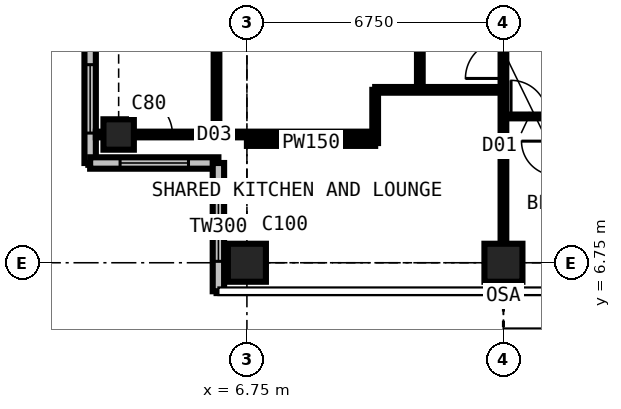
"""IFC4 building model, lengths in metres.
Left out: names, types, materials, properties, quantities, classifications, styles, units other than length and angle.
Written with IfcOpenShell. Run it as: python <this file> out.ifc"""

import sys

from ifc_helpers import new_model, si_unit, direction, frame, frame_2d, origin, origin_2d, place, context, subcontext, project, spatial, rectangle, extrude, element, fill, save


model = new_model("IFC4")
c1 = context("Model", 3, precision=1e-05, world=origin(), true_north=direction((0.0, 1.0)))
c2 = subcontext(c1, "Body", "Model", "MODEL_VIEW")
j1 = project(units=[si_unit("LENGTHUNIT", "METRE"), si_unit("PLANEANGLEUNIT", "RADIAN")], contexts=[c1])
p1 = place(None, origin())
s1 = spatial("IfcSite", under=j1, at=p1, CompositionType="ELEMENT")
p2 = place(p1, origin())
s2 = spatial("IfcBuilding", under=s1, at=p2, CompositionType="ELEMENT")
p3 = place(p2, frame((0.0, 0.0, 243.9)))
s3 = spatial("IfcBuildingStorey", under=s2, at=p3, CompositionType="ELEMENT", Elevation=243.9)
p4 = place(p3, frame((3.375, 10.125, 0.0), z_axis=(0.0, 0.0, 1.0), x_axis=(1.0, 0.0, 0.0)))
e1 = element("IfcColumn", 1, at=p4, inside=s3, PredefinedType="COLUMN", context=c2, shape_type="SweptSolid", body=[
    extrude(rectangle(XDim=0.8, YDim=0.8, at=origin_2d()), origin(), (0.0, 0.0, 1.0), 3.6),
])
for number, where, z_axis, x_axis in (
    (2, (6.75, 6.75, 0.0), (0.0, 0.0, 1.0), (1.0, 0.0, 0.0)),
    (3, (13.5, 6.75, 0.0), (0.0, 0.0, 1.0), (1.0, 0.0, 0.0)),
):
    element("IfcColumn", number, at=place(p3, frame(where, z_axis=z_axis, x_axis=x_axis)), inside=s3, PredefinedType="COLUMN", context=c2, shape_type="SweptSolid", body=[
        extrude(rectangle(XDim=1.0, YDim=1.0, at=origin_2d()), origin(), (0.0, 0.0, 1.0), 3.6),
    ])
p5 = place(p3, frame((2.625, 12.75, 0.0), z_axis=(0.0, 0.0, 1.0), x_axis=(0.0, -1.0, 0.0)))
e4 = element("IfcWall", 4, at=p5, inside=s3, PredefinedType="SOLIDWALL", context=c2, shape_type="SweptSolid", body=[
    extrude(rectangle(XDim=3.375, YDim=0.3, at=frame_2d((1.688, 0.0))), origin(), (0.0, 0.0, 1.0), 3.375),
])
p6 = place(p5, frame((0.788, 0.0, 0.6)))
e5 = element("IfcOpeningElement", 5, at=p6, cuts=e4, PredefinedType="OPENING", context=c2, shape_type="SweptSolid", body=[
    extrude(rectangle(XDim=1.8, YDim=2.1, at=frame_2d((0.9, 1.05))), frame((0.0, 0.16, 0.0), z_axis=(0.0, -1.0, 0.0), x_axis=(1.0, 0.0, 0.0)), (0.0, 0.0, 1.0), 0.32),
])
p7 = place(p3, frame((2.625, 9.375, 0.0), z_axis=(0.0, 0.0, 1.0), x_axis=(1.0, 0.0, 0.0)))
e6 = element("IfcWall", 6, at=p7, inside=s3, PredefinedType="SOLIDWALL", context=c2, shape_type="SweptSolid", body=[
    extrude(rectangle(XDim=3.375, YDim=0.3, at=frame_2d((1.688, 0.0))), origin(), (0.0, 0.0, 1.0), 3.375),
])
p8 = place(p7, frame((0.788, 0.0, 0.6)))
e7 = element("IfcOpeningElement", 7, at=p8, cuts=e6, PredefinedType="OPENING", context=c2, shape_type="SweptSolid", body=[
    extrude(rectangle(XDim=1.8, YDim=2.1, at=frame_2d((0.9, 1.05))), frame((0.0, 0.16, 0.0), z_axis=(0.0, -1.0, 0.0), x_axis=(1.0, 0.0, 0.0)), (0.0, 0.0, 1.0), 0.32),
])
p9 = place(p3, frame((6.0, 9.375, 0.0), z_axis=(0.0, 0.0, 1.0), x_axis=(0.0, -1.0, 0.0)))
e8 = element("IfcWall", 8, at=p9, inside=s3, PredefinedType="SOLIDWALL", context=c2, shape_type="SweptSolid", body=[
    extrude(rectangle(XDim=3.375, YDim=0.3, at=frame_2d((1.688, 0.0))), origin(), (0.0, 0.0, 1.0), 3.375),
])
p10 = place(p9, frame((0.788, 0.0, 0.6)))
e9 = element("IfcOpeningElement", 9, at=p10, cuts=e8, PredefinedType="OPENING", context=c2, shape_type="SweptSolid", body=[
    extrude(rectangle(XDim=1.8, YDim=2.1, at=frame_2d((0.9, 1.05))), frame((0.0, 0.16, 0.0), z_axis=(0.0, -1.0, 0.0), x_axis=(1.0, 0.0, 0.0)), (0.0, 0.0, 1.0), 0.32),
])
p11 = place(p3, frame((2.775, 10.125, 0.0), z_axis=(0.0, 0.0, 1.0), x_axis=(1.0, 0.0, 0.0)))
e10 = element("IfcWall", 10, at=p11, inside=s3, PredefinedType="PARTITIONING", context=c2, shape_type="SweptSolid", body=[
    extrude(rectangle(XDim=7.35, YDim=0.15, at=frame_2d((3.675, 0.0))), origin(), (0.0, 0.0, 1.0), 2.877),
])
p12 = place(p11, frame((1.016, 0.0, 0.0)))
e11 = element("IfcOpeningElement", 11, at=p12, cuts=e10, PredefinedType="OPENING", context=c2, shape_type="SweptSolid", body=[
    extrude(rectangle(XDim=1.0, YDim=2.2, at=frame_2d((0.5, 1.1))), frame((0.0, 0.085, 0.0), z_axis=(0.0, -1.0, 0.0), x_axis=(1.0, 0.0, 0.0)), (0.0, 0.0, 1.0), 0.17),
])
p13 = place(p3, frame((5.95, 10.125, 0.0), z_axis=(0.0, 0.0, 1.0), x_axis=(0.0, 1.0, 0.0)))
e12 = element("IfcWall", 12, at=p13, inside=s3, PredefinedType="PARTITIONING", context=c2, shape_type="SweptSolid", body=[
    extrude(rectangle(XDim=2.65, YDim=0.15, at=frame_2d((1.325, 0.0))), origin(), (0.0, 0.0, 1.0), 3.375),
])
p14 = place(p3, frame((6.75, 9.9, 0.0), z_axis=(0.0, 0.0, 1.0), x_axis=(1.0, 0.0, 0.0)))
e13 = element("IfcWall", 13, at=p14, inside=s3, PredefinedType="PARTITIONING", context=c2, shape_type="SweptSolid", body=[
    extrude(rectangle(XDim=3.375, YDim=0.15, at=frame_2d((1.688, 0.0))), origin(), (0.0, 0.0, 1.0), 3.375),
])
p15 = place(p3, frame((10.125, 9.9, 0.0), z_axis=(0.0, 0.0, 1.0), x_axis=(0.0, 1.0, 0.0)))
e14 = element("IfcWall", 14, at=p15, inside=s3, PredefinedType="PARTITIONING", context=c2, shape_type="SweptSolid", body=[
    extrude(rectangle(XDim=1.4, YDim=0.15, at=frame_2d((0.7, 0.0))), origin(), (0.0, 0.0, 1.0), 3.375),
])
p16 = place(p3, frame((10.125, 11.3, 0.0), z_axis=(0.0, 0.0, 1.0), x_axis=(1.0, 0.0, 0.0)))
e15 = element("IfcWall", 15, at=p16, inside=s3, PredefinedType="PARTITIONING", context=c2, shape_type="SweptSolid", body=[
    extrude(rectangle(XDim=3.375, YDim=0.15, at=frame_2d((1.688, 0.0))), origin(), (0.0, 0.0, 1.0), 3.375),
])
p17 = place(p3, frame((11.3, 11.3, 0.0), z_axis=(0.0, 0.0, 1.0), x_axis=(0.0, 1.0, 0.0)))
e16 = element("IfcWall", 16, at=p17, inside=s3, PredefinedType="PARTITIONING", context=c2, shape_type="SweptSolid", body=[
    extrude(rectangle(XDim=19.3, YDim=0.15, at=frame_2d((9.65, 0.0))), origin(), (0.0, 0.0, 1.0), 3.375),
])
p18 = place(p17, frame((18.1, 0.0, 0.0)))
e17 = element("IfcOpeningElement", 17, at=p18, cuts=e16, PredefinedType="OPENING", context=c2, shape_type="SweptSolid", body=[
    extrude(rectangle(XDim=1.0, YDim=2.2, at=frame_2d((0.5, 1.1))), frame((0.0, 0.085, 0.0), z_axis=(0.0, -1.0, 0.0), x_axis=(1.0, 0.0, 0.0)), (0.0, 0.0, 1.0), 0.17),
])
p19 = place(p17, frame((10.137, 0.0, 0.0)))
e18 = element("IfcOpeningElement", 18, at=p19, cuts=e16, PredefinedType="OPENING", context=c2, shape_type="SweptSolid", body=[
    extrude(rectangle(XDim=1.0, YDim=2.2, at=frame_2d((0.5, 1.1))), frame((0.0, 0.085, 0.0), z_axis=(0.0, -1.0, 0.0), x_axis=(1.0, 0.0, 0.0)), (0.0, 0.0, 1.0), 0.17),
])
p20 = place(p3, frame((13.5, 6.016, 0.0), z_axis=(0.0, 0.0, 1.0), x_axis=(0.0, 1.0, 0.0)))
e19 = element("IfcWall", 19, at=p20, inside=s3, PredefinedType="PARTITIONING", context=c2, shape_type="SweptSolid", body=[
    extrude(rectangle(XDim=6.884, YDim=0.15, at=frame_2d((3.442, 0.0))), origin(), (0.0, 0.0, 1.0), 2.61),
])
p21 = place(p20, frame((5.584, 0.0, 0.0)))
e20 = element("IfcOpeningElement", 20, at=p21, cuts=e19, PredefinedType="OPENING", context=c2, shape_type="SweptSolid", body=[
    extrude(rectangle(XDim=1.0, YDim=2.2, at=frame_2d((0.5, 1.1))), frame((0.0, 0.085, 0.0), z_axis=(0.0, -1.0, 0.0), x_axis=(1.0, 0.0, 0.0)), (0.0, 0.0, 1.0), 0.17),
])
p22 = place(p3, frame((13.5, 10.6, 0.0), z_axis=(0.0, 0.0, 1.0), x_axis=(1.0, 0.0, 0.0)))
e21 = element("IfcWall", 21, at=p22, inside=s3, PredefinedType="PARTITIONING", context=c2, shape_type="SweptSolid", body=[
    extrude(rectangle(XDim=10.125, YDim=0.1, at=frame_2d((5.062, 0.0))), origin(), (0.0, 0.0, 1.0), 3.375),
])
p23 = place(p22, frame((0.2, 0.0, 0.0)))
e22 = element("IfcOpeningElement", 22, at=p23, cuts=e21, PredefinedType="OPENING", context=c2, shape_type="SweptSolid", body=[
    extrude(rectangle(XDim=0.95, YDim=2.2, at=frame_2d((0.475, 1.1))), frame((0.0, 0.06, 0.0), z_axis=(0.0, -1.0, 0.0), x_axis=(1.0, 0.0, 0.0)), (0.0, 0.0, 1.0), 0.12),
])
p24 = place(p22, frame((3.625, 0.0, 0.0)))
e23 = element("IfcOpeningElement", 23, at=p24, cuts=e21, PredefinedType="OPENING", context=c2, shape_type="SweptSolid", body=[
    extrude(rectangle(XDim=0.95, YDim=2.2, at=frame_2d((0.475, 1.1))), frame((0.0, 0.06, 0.0), z_axis=(0.0, -1.0, 0.0), x_axis=(1.0, 0.0, 0.0)), (0.0, 0.0, 1.0), 0.12),
])
p25 = place(p22, frame((6.95, 0.0, 0.0)))
e24 = element("IfcOpeningElement", 24, at=p25, cuts=e21, PredefinedType="OPENING", context=c2, shape_type="SweptSolid", body=[
    extrude(rectangle(XDim=0.95, YDim=2.2, at=frame_2d((0.475, 1.1))), frame((0.0, 0.06, 0.0), z_axis=(0.0, -1.0, 0.0), x_axis=(1.0, 0.0, 0.0)), (0.0, 0.0, 1.0), 0.12),
])
p26 = place(p6, origin())
e25 = element("IfcWindow", 25, at=p26, inside=s3, PartitioningType="SINGLE_PANEL", PredefinedType="WINDOW", context=c2, shape_type="SweptSolid", body=[
    extrude(rectangle(XDim=1.8, YDim=2.1, at=frame_2d((0.9, 1.05))), frame((0.0, 0.03, 0.0), z_axis=(0.0, -1.0, 0.0), x_axis=(1.0, 0.0, 0.0)), (0.0, 0.0, 1.0), 0.06),
])
fill(e5, e25)
p27 = place(p8, origin())
e26 = element("IfcWindow", 26, at=p27, inside=s3, PartitioningType="SINGLE_PANEL", PredefinedType="WINDOW", context=c2, shape_type="SweptSolid", body=[
    extrude(rectangle(XDim=1.8, YDim=2.1, at=frame_2d((0.9, 1.05))), frame((0.0, 0.03, 0.0), z_axis=(0.0, -1.0, 0.0), x_axis=(1.0, 0.0, 0.0)), (0.0, 0.0, 1.0), 0.06),
])
fill(e7, e26)
p28 = place(p10, origin())
e27 = element("IfcWindow", 27, at=p28, inside=s3, PartitioningType="SINGLE_PANEL", PredefinedType="WINDOW", context=c2, shape_type="SweptSolid", body=[
    extrude(rectangle(XDim=1.8, YDim=2.1, at=frame_2d((0.9, 1.05))), frame((0.0, 0.03, 0.0), z_axis=(0.0, -1.0, 0.0), x_axis=(1.0, 0.0, 0.0)), (0.0, 0.0, 1.0), 0.06),
])
fill(e9, e27)
p29 = place(p12, origin())
e28 = element("IfcDoor", 28, at=p29, inside=s3, OperationType="SINGLE_SWING_LEFT", PredefinedType="DOOR", context=c2, shape_type="SweptSolid", body=[
    extrude(rectangle(XDim=1.0, YDim=2.2, at=frame_2d((0.5, 1.1))), frame((0.0, 0.025, 0.0), z_axis=(0.0, -1.0, 0.0), x_axis=(1.0, 0.0, 0.0)), (0.0, 0.0, 1.0), 0.05),
])
fill(e11, e28)
p30 = place(p23, origin())
e29 = element("IfcDoor", 29, at=p30, inside=s3, OperationType="SINGLE_SWING_LEFT", PredefinedType="DOOR", context=c2, shape_type="SweptSolid", body=[
    extrude(rectangle(XDim=0.95, YDim=2.2, at=frame_2d((0.475, 1.1))), frame((0.0, 0.025, 0.0), z_axis=(0.0, -1.0, 0.0), x_axis=(1.0, 0.0, 0.0)), (0.0, 0.0, 1.0), 0.05),
])
fill(e22, e29)
p31 = place(p21, origin())
e30 = element("IfcDoor", 30, at=p31, inside=s3, OperationType="SINGLE_SWING_LEFT", PredefinedType="DOOR", context=c2, shape_type="SweptSolid", body=[
    extrude(rectangle(XDim=1.0, YDim=2.2, at=frame_2d((0.5, 1.1))), frame((0.0, 0.025, 0.0), z_axis=(0.0, -1.0, 0.0), x_axis=(1.0, 0.0, 0.0)), (0.0, 0.0, 1.0), 0.05),
])
fill(e20, e30)
save(model, sys.argv[1])
